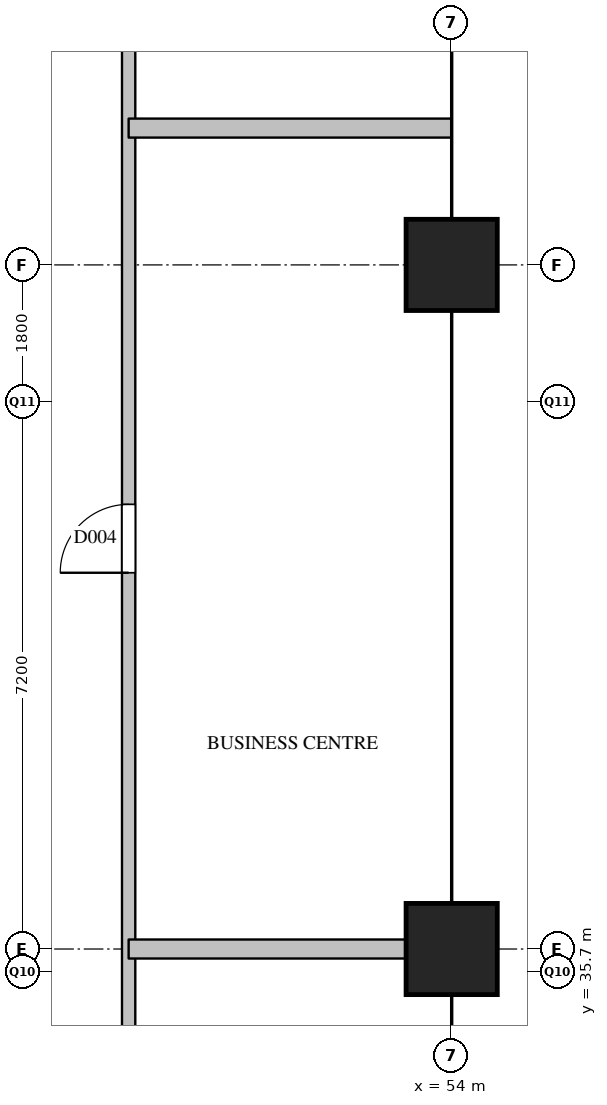
"""IFC4 building model, lengths in metres.
Left out: names, types, materials, properties, quantities, classifications, styles, units other than length and angle.
Written with IfcOpenShell. Run it as: python <this file> out.ifc"""

import sys

from ifc_helpers import new_model, si_unit, direction, frame, frame_2d, origin, origin_2d, place, context, subcontext, project, spatial, rectangle, extrude, element, fill, save


model = new_model("IFC4")
c1 = context("Model", 3, precision=1e-05, world=origin(), true_north=direction((0.0, 1.0)))
c2 = subcontext(c1, "Body", "Model", "MODEL_VIEW")
j1 = project(units=[si_unit("LENGTHUNIT", "METRE"), si_unit("PLANEANGLEUNIT", "RADIAN")], contexts=[c1])
p1 = place(None, origin())
s1 = spatial("IfcSite", under=j1, at=p1, CompositionType="ELEMENT")
p2 = place(p1, origin())
s2 = spatial("IfcBuilding", under=s1, at=p2, CompositionType="ELEMENT")
p3 = place(p2, frame((0.0, 0.0, 285.2)))
s3 = spatial("IfcBuildingStorey", under=s2, at=p3, CompositionType="ELEMENT", Elevation=285.2)
for number, where, z_axis, x_axis in (
    (1, (54.0, 36.0, 0.0), (0.0, 0.0, 1.0), (1.0, 0.0, 0.0)),
    (2, (54.0, 45.0, 0.0), (0.0, 0.0, 1.0), (1.0, 0.0, 0.0)),
):
    element("IfcColumn", number, at=place(p3, frame(where, z_axis=z_axis, x_axis=x_axis)), inside=s3, PredefinedType="COLUMN", context=c2, shape_type="SweptSolid", body=[
        extrude(rectangle(XDim=1.2, YDim=1.2, at=origin_2d()), origin(), (0.0, 0.0, 1.0), 5.0),
    ])
p4 = place(p3, frame((49.75, 28.5, 0.0), z_axis=(0.0, 0.0, 1.0), x_axis=(0.0, 1.0, 0.0)))
e3 = element("IfcWall", 3, at=p4, inside=s3, PredefinedType="PARTITIONING", context=c2, shape_type="SweptSolid", body=[
    extrude(rectangle(XDim=22.85, YDim=0.175, at=frame_2d((11.425, 0.0))), origin(), (0.0, 0.0, 1.0), 4.7),
])
p5 = place(p4, frame((3.3, 0.0, 0.0)))
e4 = element("IfcOpeningElement", 4, at=p5, cuts=e3, PredefinedType="OPENING", context=c2, shape_type="SweptSolid", body=[
    extrude(rectangle(XDim=0.9, YDim=2.1, at=frame_2d((0.45, 1.05))), frame((0.0, 0.097, 0.0), z_axis=(0.0, -1.0, 0.0), x_axis=(1.0, 0.0, 0.0)), (0.0, 0.0, 1.0), 0.195),
])
p6 = place(p4, frame((12.45, 0.0, 0.0)))
e5 = element("IfcOpeningElement", 5, at=p6, cuts=e3, PredefinedType="OPENING", context=c2, shape_type="SweptSolid", body=[
    extrude(rectangle(XDim=0.9, YDim=2.1, at=frame_2d((0.45, 1.05))), frame((0.0, 0.097, 0.0), z_axis=(0.0, -1.0, 0.0), x_axis=(1.0, 0.0, 0.0)), (0.0, 0.0, 1.0), 0.195),
])
p7 = place(p4, frame((20.125, 0.0, 0.0)))
e6 = element("IfcOpeningElement", 6, at=p7, cuts=e3, PredefinedType="OPENING", context=c2, shape_type="SweptSolid", body=[
    extrude(rectangle(XDim=0.9, YDim=2.1, at=frame_2d((0.45, 1.05))), frame((0.0, 0.097, 0.0), z_axis=(0.0, -1.0, 0.0), x_axis=(1.0, 0.0, 0.0)), (0.0, 0.0, 1.0), 0.195),
])
p8 = place(p3, frame((49.75, 36.0, 0.0), z_axis=(0.0, 0.0, 1.0), x_axis=(1.0, 0.0, 0.0)))
e7 = element("IfcWall", 7, at=p8, inside=s3, PredefinedType="PARTITIONING", context=c2, shape_type="SweptSolid", body=[
    extrude(rectangle(XDim=4.25, YDim=0.25, at=frame_2d((2.125, 0.0))), origin(), (0.0, 0.0, 1.0), 4.7),
])
p9 = place(p3, frame((49.75, 46.8, 0.0), z_axis=(0.0, 0.0, 1.0), x_axis=(1.0, 0.0, 0.0)))
e8 = element("IfcWall", 8, at=p9, inside=s3, PredefinedType="PARTITIONING", context=c2, shape_type="SweptSolid", body=[
    extrude(rectangle(XDim=4.25, YDim=0.25, at=frame_2d((2.125, 0.0))), origin(), (0.0, 0.0, 1.0), 3.7),
])
p10 = place(p6, origin())
e9 = element("IfcDoor", 9, at=p10, inside=s3, OperationType="SINGLE_SWING_LEFT", PredefinedType="DOOR", context=c2, shape_type="SweptSolid", body=[
    extrude(rectangle(XDim=0.9, YDim=2.1, at=frame_2d((0.45, 1.05))), frame((0.0, 0.025, 0.0), z_axis=(0.0, -1.0, 0.0), x_axis=(1.0, 0.0, 0.0)), (0.0, 0.0, 1.0), 0.05),
])
fill(e5, e9)
save(model, sys.argv[1])
